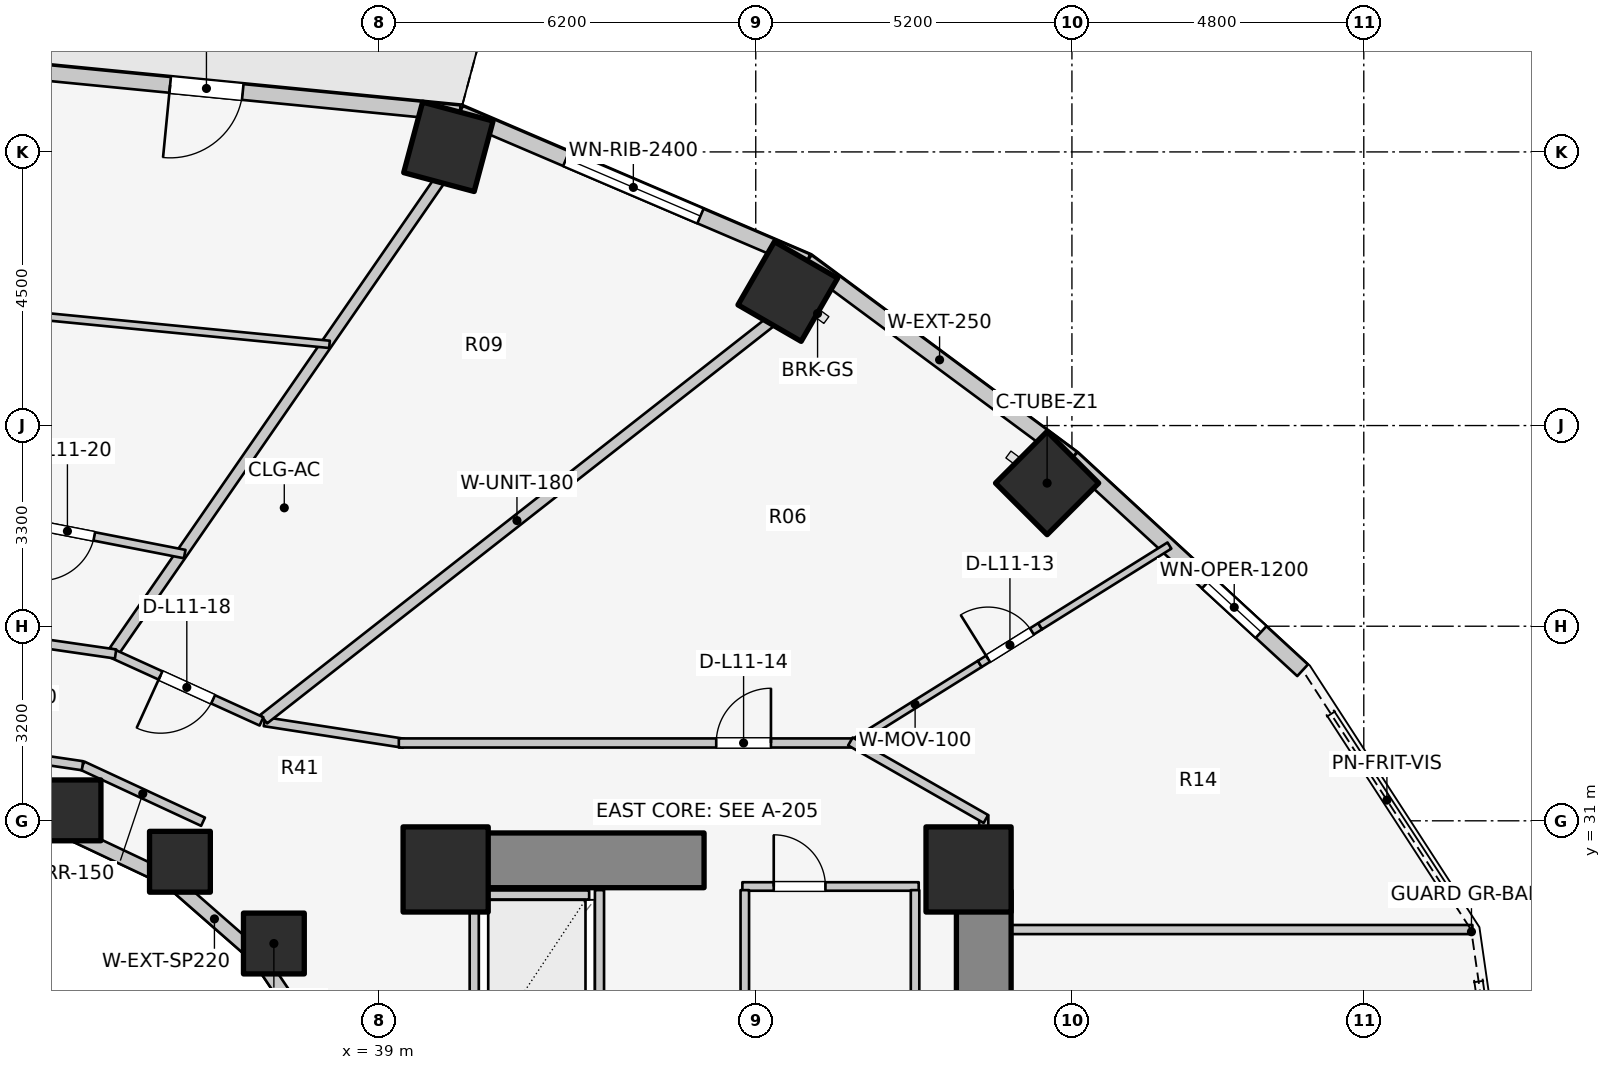
"""IFC4 building model, lengths in metres.
Left out: names, types, materials, properties, quantities, classifications, styles, units other than length and angle.
Written with IfcOpenShell. Run it as: python <this file> out.ifc"""

import sys

from ifc_helpers import new_model, si_unit, direction, frame, frame_2d, origin, origin_2d, place, context, subcontext, project, spatial, rectangle, extrude, element, fill, save


model = new_model("IFC4")
c1 = context("Model", 3, precision=1e-05, world=origin(), true_north=direction((0.0, 1.0)))
c2 = subcontext(c1, "Body", "Model", "MODEL_VIEW")
j1 = project(units=[si_unit("LENGTHUNIT", "METRE"), si_unit("PLANEANGLEUNIT", "RADIAN")], contexts=[c1])
p1 = place(None, origin())
s1 = spatial("IfcSite", under=j1, at=p1, CompositionType="ELEMENT")
p2 = place(p1, origin())
s2 = spatial("IfcBuilding", under=s1, at=p2, CompositionType="ELEMENT")
p3 = place(p2, frame((0.0, 0.0, 40.0)))
s3 = spatial("IfcBuildingStorey", under=s2, at=p3, CompositionType="ELEMENT", Elevation=40.0)
p4 = place(p3, frame((48.95, 17.05, 0.0), z_axis=(0.0, 0.0, 1.0), x_axis=(0.0, 1.0, 0.0)))
e1 = element("IfcWall", 1, at=p4, inside=s3, PredefinedType="SHEAR", context=c2, shape_type="SweptSolid", body=[
    extrude(rectangle(XDim=12.8, YDim=0.9, at=frame_2d((6.4, 0.0))), origin(), (0.0, 0.0, 1.0), 3.1),
])
p5 = place(p3, frame((39.85, 30.35, 0.0), z_axis=(0.0, 0.0, 1.0), x_axis=(1.0, 0.0, 0.0)))
e2 = element("IfcWall", 2, at=p5, inside=s3, PredefinedType="SHEAR", context=c2, shape_type="SweptSolid", body=[
    extrude(rectangle(XDim=4.5, YDim=0.9, at=frame_2d((2.25, 0.0))), origin(), (0.0, 0.0, 1.0), 3.1),
])
for number, where, z_axis, x_axis in (
    (3, (48.7, 30.2, 0.0), (0.0, 0.0, 1.0), (1.0, 0.0, 0.0)),
    (4, (40.1, 30.2, 0.0), (0.0, 0.0, 1.0), (1.0, 0.0, 0.0)),
):
    element("IfcColumn", number, at=place(p3, frame(where, z_axis=z_axis, x_axis=x_axis)), inside=s3, PredefinedType="COLUMN", context=c2, shape_type="SweptSolid", body=[
        extrude(rectangle(XDim=1.4, YDim=1.4, at=origin_2d()), origin(), (0.0, 0.0, 1.0), 3.1),
    ])
p6 = place(p3, frame((37.275, 28.982, 0.0), z_axis=(0.0, 0.0, 1.0), x_axis=(1.0, 0.0, 0.0)))
e5 = element("IfcColumn", 5, at=p6, inside=s3, PredefinedType="COLUMN", context=c2, shape_type="SweptSolid", body=[
    extrude(rectangle(XDim=1.0, YDim=1.0, at=origin_2d()), origin(), (0.0, 0.0, 1.0), 3.1),
])
p7 = place(p3, frame((49.992, 36.554, 0.0), z_axis=(0.0, 0.0, 1.0), x_axis=(0.707106781187, 0.707106781187, 0.0)))
e6 = element("IfcColumn", 6, at=p7, inside=s3, PredefinedType="COLUMN", context=c2, shape_type="SweptSolid", body=[
    extrude(rectangle(XDim=1.2, YDim=1.2, at=origin_2d()), origin(), (0.0, 0.0, 1.0), 3.1),
])
p8 = place(p3, frame((35.73, 30.327, 0.0), z_axis=(0.0, 0.0, 1.0), x_axis=(1.0, 0.0, 0.0)))
e7 = element("IfcColumn", 7, at=p8, inside=s3, PredefinedType="COLUMN", context=c2, shape_type="SweptSolid", body=[
    extrude(rectangle(XDim=1.0, YDim=1.0, at=origin_2d()), origin(), (0.0, 0.0, 1.0), 3.1),
])
p9 = place(p3, frame((45.727, 39.704, 0.0), z_axis=(0.0, 0.0, 1.0), x_axis=(0.5, 0.866025403784, 0.0)))
e8 = element("IfcColumn", 8, at=p9, inside=s3, PredefinedType="COLUMN", context=c2, shape_type="SweptSolid", body=[
    extrude(rectangle(XDim=1.2, YDim=1.2, at=origin_2d()), origin(), (0.0, 0.0, 1.0), 3.1),
])
p10 = place(p3, frame((33.931, 31.172, 0.0), z_axis=(0.0, 0.0, 1.0), x_axis=(1.0, 0.0, 0.0)))
e9 = element("IfcColumn", 9, at=p10, inside=s3, PredefinedType="COLUMN", context=c2, shape_type="SweptSolid", body=[
    extrude(rectangle(XDim=1.0, YDim=1.0, at=origin_2d()), origin(), (0.0, 0.0, 1.0), 3.1),
])
p11 = place(p3, frame((40.145, 42.084, 0.0), z_axis=(0.0, 0.0, 1.0), x_axis=(0.258819045103, 0.965925826289, 0.0)))
e10 = element("IfcColumn", 10, at=p11, inside=s3, PredefinedType="COLUMN", context=c2, shape_type="SweptSolid", body=[
    extrude(rectangle(XDim=1.2, YDim=1.2, at=origin_2d()), origin(), (0.0, 0.0, 1.0), 3.1),
])
p12 = place(p3, frame((38.166, 27.06, 0.0), z_axis=(0.0, 0.0, 1.0), x_axis=(-0.558197800898, 0.829707909492, 0.0)))
e11 = element("IfcWall", 11, at=p12, inside=s3, PredefinedType="STANDARD", context=c2, shape_type="SweptSolid", body=[
    extrude(rectangle(XDim=2.027, YDim=0.23, at=frame_2d((1.013, 0.0))), origin(), (0.0, 0.0, 1.0), 2.16),
])
p13 = place(p3, frame((37.035, 28.742, 0.0), z_axis=(0.0, 0.0, 1.0), x_axis=(-0.752576694707, 0.658504607869, 0.0)))
e12 = element("IfcWall", 12, at=p13, inside=s3, PredefinedType="STANDARD", context=c2, shape_type="SweptSolid", body=[
    extrude(rectangle(XDim=1.959, YDim=0.23, at=frame_2d((0.98, 0.0))), origin(), (0.0, 0.0, 1.0), 2.16),
])
p14 = place(p3, frame((35.56, 30.032, 0.0), z_axis=(0.0, 0.0, 1.0), x_axis=(-0.904179699603, 0.427152280606, 0.0)))
e13 = element("IfcWall", 13, at=p14, inside=s3, PredefinedType="STANDARD", context=c2, shape_type="SweptSolid", body=[
    extrude(rectangle(XDim=1.899, YDim=0.23, at=frame_2d((0.95, 0.0))), origin(), (0.0, 0.0, 1.0), 2.16),
])
p15 = place(p3, frame((33.843, 30.843, 0.0), z_axis=(0.0, 0.0, 1.0), x_axis=(-0.988901730308, 0.148571086668, 0.0)))
e14 = element("IfcWall", 14, at=p15, inside=s3, PredefinedType="STANDARD", context=c2, shape_type="SweptSolid", body=[
    extrude(rectangle(XDim=1.864, YDim=0.23, at=frame_2d((0.932, 0.0))), origin(), (0.0, 0.0, 1.0), 2.16),
])
p16 = place(p3, frame((54.194, 33.476, 0.0), z_axis=(0.0, 0.0, 1.0), x_axis=(-0.735655109293, 0.67735630223, 0.0)))
e15 = element("IfcWall", 15, at=p16, inside=s3, PredefinedType="STANDARD", context=c2, shape_type="SweptSolid", body=[
    extrude(rectangle(XDim=5.151, YDim=0.26, at=frame_2d((2.575, 0.0))), origin(), (0.0, 0.0, 1.0), 2.85),
])
p17 = place(p16, frame((0.929, 0.0, 0.75)))
e16 = element("IfcOpeningElement", 16, at=p17, cuts=e15, PredefinedType="OPENING", context=c2, shape_type="SweptSolid", body=[
    extrude(rectangle(XDim=1.2, YDim=1.5, at=frame_2d((0.6, 0.75))), frame((0.0, 0.14, 0.0), z_axis=(0.0, -1.0, 0.0), x_axis=(1.0, 0.0, 0.0)), (0.0, 0.0, 1.0), 0.28),
])
p18 = place(p3, frame((50.405, 36.965, 0.0), z_axis=(0.0, 0.0, 1.0), x_axis=(-0.803477531792, 0.595335078679, 0.0)))
e17 = element("IfcWall", 17, at=p18, inside=s3, PredefinedType="STANDARD", context=c2, shape_type="SweptSolid", body=[
    extrude(rectangle(XDim=5.43, YDim=0.26, at=frame_2d((2.715, 0.0))), origin(), (0.0, 0.0, 1.0), 2.85),
])
p19 = place(p3, frame((46.042, 40.197, 0.0), z_axis=(0.0, 0.0, 1.0), x_axis=(-0.919612132394, 0.39282760335, 0.0)))
e18 = element("IfcWall", 18, at=p19, inside=s3, PredefinedType="STANDARD", context=c2, shape_type="SweptSolid", body=[
    extrude(rectangle(XDim=6.209, YDim=0.26, at=frame_2d((3.105, 0.0))), origin(), (0.0, 0.0, 1.0), 2.85),
])
p20 = place(p19, frame((1.905, 0.0, 0.75)))
e19 = element("IfcOpeningElement", 19, at=p20, cuts=e18, PredefinedType="OPENING", context=c2, shape_type="SweptSolid", body=[
    extrude(rectangle(XDim=2.4, YDim=1.7, at=frame_2d((1.2, 0.85))), frame((0.0, 0.14, 0.0), z_axis=(0.0, -1.0, 0.0), x_axis=(1.0, 0.0, 0.0)), (0.0, 0.0, 1.0), 0.28),
])
p21 = place(p3, frame((40.332, 42.636, 0.0), z_axis=(0.0, 0.0, 1.0), x_axis=(-0.995247718352, 0.097375454379, 0.0)))
e20 = element("IfcWall", 20, at=p21, inside=s3, PredefinedType="STANDARD", context=c2, shape_type="SweptSolid", body=[
    extrude(rectangle(XDim=8.372, YDim=0.26, at=frame_2d((4.186, 0.0))), origin(), (0.0, 0.0, 1.0), 2.88),
])
p22 = place(p21, frame((3.586, 0.0, 0.0)))
e21 = element("IfcOpeningElement", 21, at=p22, cuts=e20, PredefinedType="OPENING", context=c2, shape_type="SweptSolid", body=[
    extrude(rectangle(XDim=1.2, YDim=2.2, at=frame_2d((0.6, 1.1))), frame((0.0, 0.14, 0.0), z_axis=(0.0, -1.0, 0.0), x_axis=(1.0, 0.0, 0.0)), (0.0, 0.0, 1.0), 0.28),
])
p23 = place(p3, frame((40.74, 29.78, 0.0), z_axis=(0.0, 0.0, 1.0), x_axis=(1.0, 0.0, 0.0)))
e22 = element("IfcWall", 22, at=p23, inside=s3, PredefinedType="SOLIDWALL", context=c2, shape_type="SweptSolid", body=[
    extrude(rectangle(XDim=1.72, YDim=0.15, at=frame_2d((0.86, 0.0))), origin(), (0.0, 0.0, 1.0), 2.855),
])
for number, where, z_axis, x_axis in (
    (23, (40.57, 27.14, 0.0), (0.0, 0.0, 1.0), (0.0, 1.0, 0.0)),
    (24, (42.63, 27.14, 0.0), (0.0, 0.0, 1.0), (0.0, 1.0, 0.0)),
):
    element("IfcWall", number, at=place(p3, frame(where, z_axis=z_axis, x_axis=x_axis)), inside=s3, PredefinedType="SOLIDWALL", context=c2, shape_type="SweptSolid", body=[
        extrude(rectangle(XDim=2.72, YDim=0.15, at=frame_2d((1.36, 0.0))), origin(), (0.0, 0.0, 1.0), 2.855),
    ])
p24 = place(p3, frame((44.98, 29.92, 0.0), z_axis=(0.0, 0.0, 1.0), x_axis=(1.0, 0.0, 0.0)))
e25 = element("IfcWall", 25, at=p24, inside=s3, PredefinedType="PLUMBINGWALL", context=c2, shape_type="SweptSolid", body=[
    extrude(rectangle(XDim=2.9, YDim=0.14, at=frame_2d((1.45, 0.0))), origin(), (0.0, 0.0, 1.0), 2.855),
])
p25 = place(p24, frame((0.516, 0.0, 0.0)))
e26 = element("IfcOpeningElement", 26, at=p25, cuts=e25, PredefinedType="OPENING", context=c2, shape_type="SweptSolid", body=[
    extrude(rectangle(XDim=0.85, YDim=2.05, at=frame_2d((0.425, 1.025))), frame((0.0, 0.08, 0.0), z_axis=(0.0, -1.0, 0.0), x_axis=(1.0, 0.0, 0.0)), (0.0, 0.0, 1.0), 0.16),
])
for number, where, z_axis, x_axis in (
    (27, (45.02, 25.98, 0.0), (0.0, 0.0, 1.0), (0.0, 1.0, 0.0)),
    (28, (47.82, 25.98, 0.0), (0.0, 0.0, 1.0), (0.0, 1.0, 0.0)),
):
    element("IfcWall", number, at=place(p3, frame(where, z_axis=z_axis, x_axis=x_axis)), inside=s3, PredefinedType="PLUMBINGWALL", context=c2, shape_type="SweptSolid", body=[
        extrude(rectangle(XDim=3.88, YDim=0.14, at=frame_2d((1.94, 0.0))), origin(), (0.0, 0.0, 1.0), 2.855),
    ])
p26 = place(p3, frame((36.11, 30.985, 0.0), z_axis=(0.0, 0.0, 1.0), x_axis=(-0.906943449489, 0.421252393975, 0.0)))
e29 = element("IfcWall", 29, at=p26, inside=s3, PredefinedType="PARTITIONING", context=c2, shape_type="SweptSolid", body=[
    extrude(rectangle(XDim=2.186, YDim=0.15, at=frame_2d((1.093, 0.0))), origin(), (0.0, 0.0, 1.0), 2.237),
])
p27 = place(p3, frame((34.127, 31.906, 0.0), z_axis=(0.0, 0.0, 1.0), x_axis=(-0.989268584896, 0.146108408166, 0.0)))
e30 = element("IfcWall", 30, at=p27, inside=s3, PredefinedType="PARTITIONING", context=c2, shape_type="SweptSolid", body=[
    extrude(rectangle(XDim=2.151, YDim=0.15, at=frame_2d((1.075, 0.0))), origin(), (0.0, 0.0, 1.0), 2.237),
])
p28 = place(p3, frame((48.95, 29.212, 0.0), z_axis=(0.0, 0.0, 1.0), x_axis=(1.0, 0.0, 0.0)))
e31 = element("IfcWall", 31, at=p28, inside=s3, PredefinedType="PARTITIONING", context=c2, shape_type="SweptSolid", body=[
    extrude(rectangle(XDim=8.036, YDim=0.15, at=frame_2d((4.018, 0.0))), origin(), (0.0, 0.0, 1.0), 2.855),
])
p29 = place(p3, frame((48.95, 29.8, 0.0), z_axis=(0.0, 0.0, 1.0), x_axis=(0.0, 1.0, 0.0)))
e32 = element("IfcWall", 32, at=p29, inside=s3, PredefinedType="PARTITIONING", context=c2, shape_type="SweptSolid", body=[
    extrude(rectangle(XDim=1.29, YDim=0.15, at=frame_2d((0.645, 0.0))), origin(), (0.0, 0.0, 1.0), 2.069),
])
p30 = place(p3, frame((46.758, 32.253, 0.0), z_axis=(0.0, 0.0, 1.0), x_axis=(0.848408422278, 0.529342185177, 0.0)))
e33 = element("IfcWall", 33, at=p30, inside=s3, PredefinedType="MOVABLE", context=c2, shape_type="SweptSolid", body=[
    extrude(rectangle(XDim=2.507, YDim=0.12, at=frame_2d((1.253, 0.0))), origin(), (0.0, 0.0, 1.0), 2.855),
])
p31 = place(p3, frame((48.884, 33.58, 0.0), z_axis=(0.0, 0.0, 1.0), x_axis=(0.848396621262, 0.529361098903, 0.0)))
e34 = element("IfcWall", 34, at=p31, inside=s3, PredefinedType="MOVABLE", context=c2, shape_type="SweptSolid", body=[
    extrude(rectangle(XDim=1.17, YDim=0.12, at=frame_2d((0.585, 0.0))), origin(), (0.0, 0.0, 1.0), 2.11),
])
p32 = place(p31, frame((0.16, 0.0, 0.0)))
e35 = element("IfcOpeningElement", 35, at=p32, cuts=e34, PredefinedType="OPENING", context=c2, shape_type="SweptSolid", body=[
    extrude(rectangle(XDim=0.85, YDim=2.05, at=frame_2d((0.425, 1.025))), frame((0.0, 0.07, 0.0), z_axis=(0.0, -1.0, 0.0), x_axis=(1.0, 0.0, 0.0)), (0.0, 0.0, 1.0), 0.14),
])
p33 = place(p3, frame((49.877, 34.2, 0.0), z_axis=(0.0, 0.0, 1.0), x_axis=(0.848424873637, 0.529315816687, 0.0)))
e36 = element("IfcWall", 36, at=p33, inside=s3, PredefinedType="MOVABLE", context=c2, shape_type="SweptSolid", body=[
    extrude(rectangle(XDim=2.506, YDim=0.12, at=frame_2d((1.253, 0.0))), origin(), (0.0, 0.0, 1.0), 2.855),
])
p34 = place(p3, frame((37.119, 32.631, 0.0), z_axis=(0.0, 0.0, 1.0), x_axis=(0.988184633586, -0.153268163508, 0.0)))
e37 = element("IfcWall", 37, at=p34, inside=s3, PredefinedType="PARTITIONING", context=c2, shape_type="SweptSolid", body=[
    extrude(rectangle(XDim=2.318, YDim=0.15, at=frame_2d((1.159, 0.0))), origin(), (0.0, 0.0, 1.0), 2.237),
])
p35 = place(p3, frame((39.33, 32.28, 0.0), z_axis=(0.0, 0.0, 1.0), x_axis=(1.0, 0.0, 0.0)))
e38 = element("IfcWall", 38, at=p35, inside=s3, PredefinedType="PARTITIONING", context=c2, shape_type="SweptSolid", body=[
    extrude(rectangle(XDim=7.52, YDim=0.15, at=frame_2d((3.76, 0.0))), origin(), (0.0, 0.0, 1.0), 2.237),
])
p36 = place(p35, frame((5.22, 0.0, 0.0)))
e39 = element("IfcOpeningElement", 39, at=p36, cuts=e38, PredefinedType="OPENING", context=c2, shape_type="SweptSolid", body=[
    extrude(rectangle(XDim=0.9, YDim=2.1, at=frame_2d((0.45, 1.05))), frame((0.0, 0.085, 0.0), z_axis=(0.0, -1.0, 0.0), x_axis=(1.0, 0.0, 0.0)), (0.0, 0.0, 1.0), 0.17),
])
p37 = place(p3, frame((46.757, 32.305, 0.0), z_axis=(0.0, 0.0, 1.0), x_axis=(0.867991349648, -0.496579315857, 0.0)))
e40 = element("IfcWall", 40, at=p37, inside=s3, PredefinedType="PARTITIONING", context=c2, shape_type="SweptSolid", body=[
    extrude(rectangle(XDim=2.567, YDim=0.15, at=frame_2d((1.283, 0.0))), origin(), (0.0, 0.0, 1.0), 2.069),
])
p38 = place(p3, frame((37.108, 32.673, 0.0), z_axis=(0.0, 0.0, 1.0), x_axis=(0.78700868866, 0.616941912966, 0.0)))
e41 = element("IfcWall", 41, at=p38, inside=s3, PredefinedType="PARTITIONING", context=c2, shape_type="SweptSolid", body=[
    extrude(rectangle(XDim=10.583, YDim=0.18, at=frame_2d((5.292, 0.0))), origin(), (0.0, 0.0, 1.0), 2.237),
])
p39 = place(p3, frame((34.653, 33.796, 0.0), z_axis=(0.0, 0.0, 1.0), x_axis=(0.568631434817, 0.822592421153, 0.0)))
e42 = element("IfcWall", 42, at=p39, inside=s3, PredefinedType="PARTITIONING", context=c2, shape_type="SweptSolid", body=[
    extrude(rectangle(XDim=9.394, YDim=0.18, at=frame_2d((4.697, 0.0))), origin(), (0.0, 0.0, 1.0), 2.237),
])
p40 = place(p3, frame((37.071, 32.635, 0.0), z_axis=(0.0, 0.0, 1.0), x_axis=(-0.910186679378, 0.414198272186, 0.0)))
e43 = element("IfcWall", 43, at=p40, inside=s3, PredefinedType="PARTITIONING", context=c2, shape_type="SweptSolid", body=[
    extrude(rectangle(XDim=2.698, YDim=0.15, at=frame_2d((1.349, 0.0))), origin(), (0.0, 0.0, 1.0), 2.237),
])
p41 = place(p40, frame((0.874, 0.0, 0.0)))
e44 = element("IfcOpeningElement", 44, at=p41, cuts=e43, PredefinedType="OPENING", context=c2, shape_type="SweptSolid", body=[
    extrude(rectangle(XDim=0.95, YDim=2.1, at=frame_2d((0.475, 1.05))), frame((0.0, 0.085, 0.0), z_axis=(0.0, -1.0, 0.0), x_axis=(1.0, 0.0, 0.0)), (0.0, 0.0, 1.0), 0.17),
])
p42 = place(p3, frame((38.19, 38.835, 0.0), z_axis=(0.0, 0.0, 1.0), x_axis=(-0.995257435484, 0.097276087063, 0.0)))
e45 = element("IfcWall", 45, at=p42, inside=s3, PredefinedType="MOVABLE", context=c2, shape_type="SweptSolid", body=[
    extrude(rectangle(XDim=6.229, YDim=0.12, at=frame_2d((3.115, 0.0))), origin(), (0.0, 0.0, 1.0), 2.237),
])
p43 = place(p3, frame((34.671, 33.744, 0.0), z_axis=(0.0, 0.0, 1.0), x_axis=(-0.989701115085, 0.143149232617, 0.0)))
e46 = element("IfcWall", 46, at=p43, inside=s3, PredefinedType="PARTITIONING", context=c2, shape_type="SweptSolid", body=[
    extrude(rectangle(XDim=2.749, YDim=0.15, at=frame_2d((1.375, 0.0))), origin(), (0.0, 0.0, 1.0), 2.237),
])
p44 = place(p3, frame((35.808, 35.386, 0.0), z_axis=(0.0, 0.0, 1.0), x_axis=(-0.981464096276, 0.191646100197, 0.0)))
e47 = element("IfcWall", 47, at=p44, inside=s3, PredefinedType="PLUMBINGWALL", context=c2, shape_type="SweptSolid", body=[
    extrude(rectangle(XDim=3.93, YDim=0.14, at=frame_2d((1.965, 0.0))), origin(), (0.0, 0.0, 1.0), 2.237),
])
p45 = place(p44, frame((1.515, 0.0, 0.0)))
e48 = element("IfcOpeningElement", 48, at=p45, cuts=e47, PredefinedType="OPENING", context=c2, shape_type="SweptSolid", body=[
    extrude(rectangle(XDim=0.9, YDim=2.1, at=frame_2d((0.45, 1.05))), frame((0.0, 0.08, 0.0), z_axis=(0.0, -1.0, 0.0), x_axis=(1.0, 0.0, 0.0)), (0.0, 0.0, 1.0), 0.16),
])
p46 = place(p17, origin())
e49 = element("IfcWindow", 49, at=p46, inside=s3, PartitioningType="SINGLE_PANEL", PredefinedType="WINDOW", context=c2, shape_type="SweptSolid", body=[
    extrude(rectangle(XDim=1.2, YDim=1.5, at=frame_2d((0.6, 0.75))), frame((0.0, 0.03, 0.0), z_axis=(0.0, -1.0, 0.0), x_axis=(1.0, 0.0, 0.0)), (0.0, 0.0, 1.0), 0.06),
])
fill(e16, e49)
p47 = place(p20, origin())
e50 = element("IfcWindow", 50, at=p47, inside=s3, PartitioningType="SINGLE_PANEL", PredefinedType="WINDOW", context=c2, shape_type="SweptSolid", body=[
    extrude(rectangle(XDim=2.4, YDim=1.7, at=frame_2d((1.2, 0.85))), frame((0.0, 0.03, 0.0), z_axis=(0.0, -1.0, 0.0), x_axis=(1.0, 0.0, 0.0)), (0.0, 0.0, 1.0), 0.06),
])
fill(e19, e50)
p48 = place(p22, origin())
e51 = element("IfcDoor", 51, at=p48, inside=s3, OperationType="SINGLE_SWING_RIGHT", PredefinedType="DOOR", context=c2, shape_type="SweptSolid", body=[
    extrude(rectangle(XDim=1.2, YDim=2.2, at=frame_2d((0.6, 1.1))), frame((0.0, 0.025, 0.0), z_axis=(0.0, -1.0, 0.0), x_axis=(1.0, 0.0, 0.0)), (0.0, 0.0, 1.0), 0.05),
])
fill(e21, e51)
p49 = place(p25, origin())
e52 = element("IfcDoor", 52, at=p49, inside=s3, OperationType="SINGLE_SWING_LEFT", PredefinedType="DOOR", context=c2, shape_type="SweptSolid", body=[
    extrude(rectangle(XDim=0.85, YDim=2.05, at=frame_2d((0.425, 1.025))), frame((0.0, 0.025, 0.0), z_axis=(0.0, -1.0, 0.0), x_axis=(1.0, 0.0, 0.0)), (0.0, 0.0, 1.0), 0.05),
])
fill(e26, e52)
p50 = place(p32, origin())
e53 = element("IfcDoor", 53, at=p50, inside=s3, OperationType="SINGLE_SWING_LEFT", PredefinedType="DOOR", context=c2, shape_type="SweptSolid", body=[
    extrude(rectangle(XDim=0.85, YDim=2.05, at=frame_2d((0.425, 1.025))), frame((0.0, 0.025, 0.0), z_axis=(0.0, -1.0, 0.0), x_axis=(1.0, 0.0, 0.0)), (0.0, 0.0, 1.0), 0.05),
])
fill(e35, e53)
p51 = place(p36, origin())
e54 = element("IfcDoor", 54, at=p51, inside=s3, OperationType="SINGLE_SWING_RIGHT", PredefinedType="DOOR", context=c2, shape_type="SweptSolid", body=[
    extrude(rectangle(XDim=0.9, YDim=2.1, at=frame_2d((0.45, 1.05))), frame((0.0, 0.025, 0.0), z_axis=(0.0, -1.0, 0.0), x_axis=(1.0, 0.0, 0.0)), (0.0, 0.0, 1.0), 0.05),
])
fill(e39, e54)
p52 = place(p41, origin())
e55 = element("IfcDoor", 55, at=p52, inside=s3, OperationType="SINGLE_SWING_RIGHT", PredefinedType="DOOR", context=c2, shape_type="SweptSolid", body=[
    extrude(rectangle(XDim=0.95, YDim=2.1, at=frame_2d((0.475, 1.05))), frame((0.0, 0.025, 0.0), z_axis=(0.0, -1.0, 0.0), x_axis=(1.0, 0.0, 0.0)), (0.0, 0.0, 1.0), 0.05),
])
fill(e44, e55)
p53 = place(p45, origin())
e56 = element("IfcDoor", 56, at=p53, inside=s3, OperationType="SINGLE_SWING_RIGHT", PredefinedType="DOOR", context=c2, shape_type="SweptSolid", body=[
    extrude(rectangle(XDim=0.9, YDim=2.1, at=frame_2d((0.45, 1.05))), frame((0.0, 0.025, 0.0), z_axis=(0.0, -1.0, 0.0), x_axis=(1.0, 0.0, 0.0)), (0.0, 0.0, 1.0), 0.05),
])
fill(e48, e56)
save(model, sys.argv[1])
